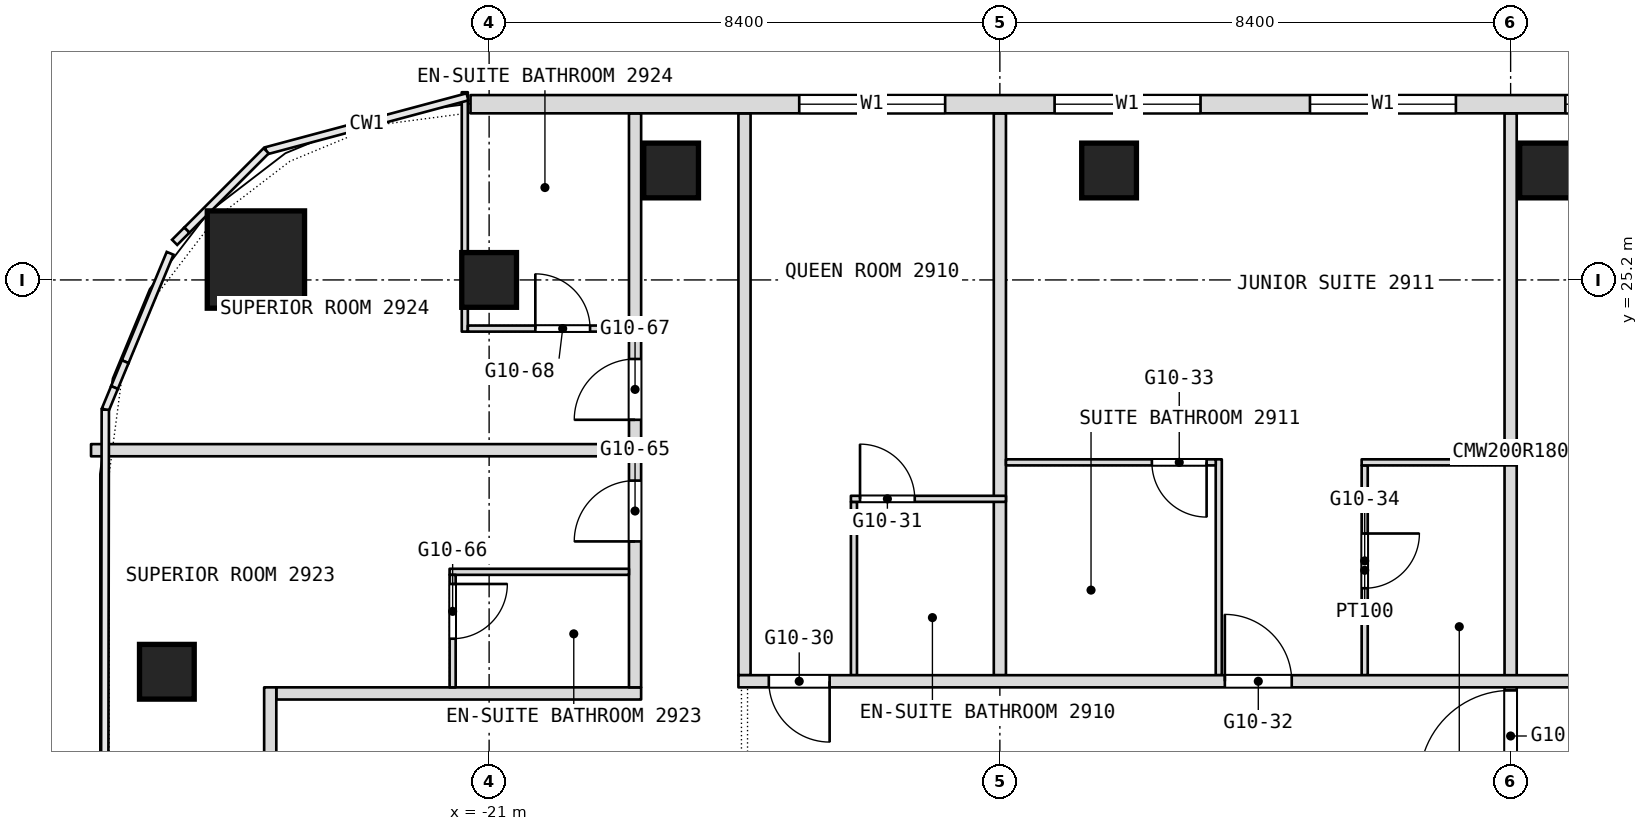
"""IFC4 building model, lengths in metres.
Left out: names, types, materials, properties, quantities, classifications, styles, units other than length and angle.
Written with IfcOpenShell. Run it as: python <this file> out.ifc"""

import sys

from ifc_helpers import new_model, si_unit, direction, frame, frame_2d, origin, origin_2d, place, context, subcontext, project, spatial, rectangle, extrude, element, fill, save


model = new_model("IFC4")
c1 = context("Model", 3, precision=1e-05, world=origin(), true_north=direction((0.0, 1.0)))
c2 = subcontext(c1, "Body", "Model", "MODEL_VIEW")
j1 = project(units=[si_unit("LENGTHUNIT", "METRE"), si_unit("PLANEANGLEUNIT", "RADIAN")], contexts=[c1])
p1 = place(None, origin())
s1 = spatial("IfcSite", under=j1, at=p1, CompositionType="ELEMENT")
p2 = place(p1, origin())
s2 = spatial("IfcBuilding", under=s1, at=p2, CompositionType="ELEMENT")
p3 = place(p2, frame((0.0, 0.0, 130.1)))
s3 = spatial("IfcBuildingStorey", under=s2, at=p3, CompositionType="ELEMENT", Elevation=130.1)
p4 = place(p3, frame((-24.835, 25.535, 0.0), z_axis=(0.0, 0.0, 1.0), x_axis=(1.0, 0.0, 0.0)))
e1 = element("IfcColumn", 1, at=p4, inside=s3, PredefinedType="COLUMN", context=c2, shape_type="SweptSolid", body=[
    extrude(rectangle(XDim=1.6, YDim=1.6, at=origin_2d()), origin(), (0.0, 0.0, 1.0), 3.6),
])
for number, where, z_axis, x_axis in (
    (2, (-21.0, 25.2, 0.0), (0.0, 0.0, 1.0), (1.0, 0.0, 0.0)),
    (3, (-26.3, 18.756, 0.0), (0.0, 0.0, 1.0), (1.0, 0.0, 0.0)),
    (4, (-18.007, 27.0, 0.0), (0.0, 0.0, 1.0), (1.0, 0.0, 0.0)),
    (5, (-10.804, 27.0, 0.0), (0.0, 0.0, 1.0), (1.0, 0.0, 0.0)),
    (6, (-3.601, 27.0, 0.0), (0.0, 0.0, 1.0), (1.0, 0.0, 0.0)),
):
    element("IfcColumn", number, at=place(p3, frame(where, z_axis=z_axis, x_axis=x_axis)), inside=s3, PredefinedType="COLUMN", context=c2, shape_type="SweptSolid", body=[
        extrude(rectangle(XDim=0.9, YDim=0.9, at=origin_2d()), origin(), (0.0, 0.0, 1.0), 3.6),
    ])
p5 = place(p3, frame((-4.2, 16.8, 0.0), z_axis=(0.0, 0.0, 1.0), x_axis=(0.0, 1.0, 0.0)))
e7 = element("IfcWall", 7, at=p5, inside=s3, PredefinedType="PARTITIONING", context=c2, shape_type="SweptSolid", body=[
    extrude(rectangle(XDim=11.14, YDim=0.2, at=frame_2d((5.57, 0.0))), origin(), (0.0, 0.0, 1.0), 3.34),
])
p6 = place(p5, frame((0.15, 0.0, 0.0)))
e8 = element("IfcOpeningElement", 8, at=p6, cuts=e7, PredefinedType="OPENING", context=c2, shape_type="SweptSolid", body=[
    extrude(rectangle(XDim=1.5, YDim=2.1, at=frame_2d((0.75, 1.05))), frame((0.0, 0.1, 0.0), z_axis=(0.0, -1.0, 0.0), x_axis=(1.0, 0.0, 0.0)), (0.0, 0.0, 1.0), 0.2),
])
p7 = place(p3, frame((-6.6, 18.7, 0.0), z_axis=(0.0, 0.0, 1.0), x_axis=(0.0, 1.0, 0.0)))
e9 = element("IfcWall", 9, at=p7, inside=s3, PredefinedType="PARTITIONING", context=c2, shape_type="SweptSolid", body=[
    extrude(rectangle(XDim=3.45, YDim=0.1, at=frame_2d((1.725, 0.0))), origin(), (0.0, 0.0, 1.0), 3.34),
])
p8 = place(p7, frame((1.43, 0.0, 0.0)))
e10 = element("IfcOpeningElement", 10, at=p8, cuts=e9, PredefinedType="OPENING", context=c2, shape_type="SweptSolid", body=[
    extrude(rectangle(XDim=0.9, YDim=2.1, at=frame_2d((0.45, 1.05))), frame((0.0, 0.05, 0.0), z_axis=(0.0, -1.0, 0.0), x_axis=(1.0, 0.0, 0.0)), (0.0, 0.0, 1.0), 0.1),
])
p9 = place(p3, frame((-9.0, 18.7, 0.0), z_axis=(0.0, 0.0, 1.0), x_axis=(0.0, 1.0, 0.0)))
e11 = element("IfcWall", 11, at=p9, inside=s3, PredefinedType="PARTITIONING", context=c2, shape_type="SweptSolid", body=[
    extrude(rectangle(XDim=3.55, YDim=0.1, at=frame_2d((1.775, 0.0))), origin(), (0.0, 0.0, 1.0), 3.34),
])
p10 = place(p3, frame((-12.6, 18.7, 0.0), z_axis=(0.0, 0.0, 1.0), x_axis=(0.0, 1.0, 0.0)))
e12 = element("IfcWall", 12, at=p10, inside=s3, PredefinedType="PARTITIONING", context=c2, shape_type="SweptSolid", body=[
    extrude(rectangle(XDim=9.24, YDim=0.2, at=frame_2d((4.62, 0.0))), origin(), (0.0, 0.0, 1.0), 3.34),
])
p11 = place(p3, frame((-15.0, 18.7, 0.0), z_axis=(0.0, 0.0, 1.0), x_axis=(0.0, 1.0, 0.0)))
e13 = element("IfcWall", 13, at=p11, inside=s3, PredefinedType="PARTITIONING", context=c2, shape_type="SweptSolid", body=[
    extrude(rectangle(XDim=2.85, YDim=0.1, at=frame_2d((1.425, 0.0))), origin(), (0.0, 0.0, 1.0), 3.34),
])
p12 = place(p3, frame((-16.8, 18.7, 0.0), z_axis=(0.0, 0.0, 1.0), x_axis=(0.0, 1.0, 0.0)))
e14 = element("IfcWall", 14, at=p12, inside=s3, PredefinedType="PARTITIONING", context=c2, shape_type="SweptSolid", body=[
    extrude(rectangle(XDim=9.24, YDim=0.2, at=frame_2d((4.62, 0.0))), origin(), (0.0, 0.0, 1.0), 3.34),
])
p13 = place(p3, frame((-24.5, 18.4, 0.0), z_axis=(0.0, 0.0, 1.0), x_axis=(1.0, 0.0, 0.0)))
e15 = element("IfcWall", 15, at=p13, inside=s3, PredefinedType="PARTITIONING", context=c2, shape_type="SweptSolid", body=[
    extrude(rectangle(XDim=6.0, YDim=0.2, at=frame_2d((3.0, 0.0))), origin(), (0.0, 0.0, 1.0), 3.34),
])
p14 = place(p3, frame((-18.6, 18.5, 0.0), z_axis=(0.0, 0.0, 1.0), x_axis=(0.0, 1.0, 0.0)))
e16 = element("IfcWall", 16, at=p14, inside=s3, PredefinedType="PARTITIONING", context=c2, shape_type="SweptSolid", body=[
    extrude(rectangle(XDim=9.44, YDim=0.2, at=frame_2d((4.72, 0.0))), origin(), (0.0, 0.0, 1.0), 3.34),
])
p15 = place(p14, frame((2.4, 0.0, 0.0)))
e17 = element("IfcOpeningElement", 17, at=p15, cuts=e16, PredefinedType="OPENING", context=c2, shape_type="SweptSolid", body=[
    extrude(rectangle(XDim=1.0, YDim=2.1, at=frame_2d((0.5, 1.05))), frame((0.0, 0.1, 0.0), z_axis=(0.0, -1.0, 0.0), x_axis=(1.0, 0.0, 0.0)), (0.0, 0.0, 1.0), 0.2),
])
p16 = place(p14, frame((4.4, 0.0, 0.0)))
e18 = element("IfcOpeningElement", 18, at=p16, cuts=e16, PredefinedType="OPENING", context=c2, shape_type="SweptSolid", body=[
    extrude(rectangle(XDim=1.0, YDim=2.1, at=frame_2d((0.5, 1.05))), frame((0.0, 0.1, 0.0), z_axis=(0.0, -1.0, 0.0), x_axis=(1.0, 0.0, 0.0)), (0.0, 0.0, 1.0), 0.2),
])
p17 = place(p3, frame((-16.9, 18.6, 0.0), z_axis=(0.0, 0.0, 1.0), x_axis=(1.0, 0.0, 0.0)))
e19 = element("IfcWall", 19, at=p17, inside=s3, PredefinedType="PARTITIONING", context=c2, shape_type="SweptSolid", body=[
    extrude(rectangle(XDim=18.4, YDim=0.2, at=frame_2d((9.2, 0.0))), origin(), (0.0, 0.0, 1.0), 3.34),
])
p18 = place(p17, frame((0.5, 0.0, 0.0)))
e20 = element("IfcOpeningElement", 20, at=p18, cuts=e19, PredefinedType="OPENING", context=c2, shape_type="SweptSolid", body=[
    extrude(rectangle(XDim=1.0, YDim=2.1, at=frame_2d((0.5, 1.05))), frame((0.0, 0.1, 0.0), z_axis=(0.0, -1.0, 0.0), x_axis=(1.0, 0.0, 0.0)), (0.0, 0.0, 1.0), 0.2),
])
p19 = place(p17, frame((8.0, 0.0, 0.0)))
e21 = element("IfcOpeningElement", 21, at=p19, cuts=e19, PredefinedType="OPENING", context=c2, shape_type="SweptSolid", body=[
    extrude(rectangle(XDim=1.1, YDim=2.1, at=frame_2d((0.55, 1.05))), frame((0.0, 0.1, 0.0), z_axis=(0.0, -1.0, 0.0), x_axis=(1.0, 0.0, 0.0)), (0.0, 0.0, 1.0), 0.2),
])
p20 = place(p17, frame((16.0, 0.0, 0.0)))
e22 = element("IfcOpeningElement", 22, at=p20, cuts=e19, PredefinedType="OPENING", context=c2, shape_type="SweptSolid", body=[
    extrude(rectangle(XDim=1.8, YDim=2.1, at=frame_2d((0.9, 1.05))), frame((0.0, 0.1, 0.0), z_axis=(0.0, -1.0, 0.0), x_axis=(1.0, 0.0, 0.0)), (0.0, 0.0, 1.0), 0.2),
])
p21 = place(p3, frame((-21.65, 20.4, 0.0), z_axis=(0.0, 0.0, 1.0), x_axis=(1.0, 0.0, 0.0)))
e23 = element("IfcWall", 23, at=p21, inside=s3, PredefinedType="PARTITIONING", context=c2, shape_type="SweptSolid", body=[
    extrude(rectangle(XDim=2.95, YDim=0.1, at=frame_2d((1.475, 0.0))), origin(), (0.0, 0.0, 1.0), 3.34),
])
p22 = place(p3, frame((-21.4, 24.35, 0.0), z_axis=(0.0, 0.0, 1.0), x_axis=(0.0, 1.0, 0.0)))
e24 = element("IfcWall", 24, at=p22, inside=s3, PredefinedType="PARTITIONING", context=c2, shape_type="SweptSolid", body=[
    extrude(rectangle(XDim=3.937, YDim=0.1, at=frame_2d((1.969, 0.0))), origin(), (0.0, 0.0, 1.0), 3.34),
])
p23 = place(p3, frame((-21.6, 18.5, 0.0), z_axis=(0.0, 0.0, 1.0), x_axis=(0.0, 1.0, 0.0)))
e25 = element("IfcWall", 25, at=p23, inside=s3, PredefinedType="PARTITIONING", context=c2, shape_type="SweptSolid", body=[
    extrude(rectangle(XDim=1.85, YDim=0.1, at=frame_2d((0.925, 0.0))), origin(), (0.0, 0.0, 1.0), 3.34),
])
p24 = place(p23, frame((0.8, 0.0, 0.0)))
e26 = element("IfcOpeningElement", 26, at=p24, cuts=e25, PredefinedType="OPENING", context=c2, shape_type="SweptSolid", body=[
    extrude(rectangle(XDim=0.9, YDim=2.1, at=frame_2d((0.45, 1.05))), frame((0.0, 0.05, 0.0), z_axis=(0.0, -1.0, 0.0), x_axis=(1.0, 0.0, 0.0)), (0.0, 0.0, 1.0), 0.1),
])
p25 = place(p3, frame((-15.05, 21.6, 0.0), z_axis=(0.0, 0.0, 1.0), x_axis=(1.0, 0.0, 0.0)))
e27 = element("IfcWall", 27, at=p25, inside=s3, PredefinedType="PARTITIONING", context=c2, shape_type="SweptSolid", body=[
    extrude(rectangle(XDim=2.55, YDim=0.1, at=frame_2d((1.275, 0.0))), origin(), (0.0, 0.0, 1.0), 3.34),
])
p26 = place(p25, frame((0.15, 0.0, 0.0)))
e28 = element("IfcOpeningElement", 28, at=p26, cuts=e27, PredefinedType="OPENING", context=c2, shape_type="SweptSolid", body=[
    extrude(rectangle(XDim=0.9, YDim=2.1, at=frame_2d((0.45, 1.05))), frame((0.0, 0.05, 0.0), z_axis=(0.0, -1.0, 0.0), x_axis=(1.0, 0.0, 0.0)), (0.0, 0.0, 1.0), 0.1),
])
p27 = place(p3, frame((-12.5, 22.2, 0.0), z_axis=(0.0, 0.0, 1.0), x_axis=(1.0, 0.0, 0.0)))
e29 = element("IfcWall", 29, at=p27, inside=s3, PredefinedType="PARTITIONING", context=c2, shape_type="SweptSolid", body=[
    extrude(rectangle(XDim=3.45, YDim=0.1, at=frame_2d((1.725, 0.0))), origin(), (0.0, 0.0, 1.0), 3.34),
])
p28 = place(p27, frame((2.4, 0.0, 0.0)))
e30 = element("IfcOpeningElement", 30, at=p28, cuts=e29, PredefinedType="OPENING", context=c2, shape_type="SweptSolid", body=[
    extrude(rectangle(XDim=0.9, YDim=2.1, at=frame_2d((0.45, 1.05))), frame((0.0, 0.05, 0.0), z_axis=(0.0, -1.0, 0.0), x_axis=(1.0, 0.0, 0.0)), (0.0, 0.0, 1.0), 0.1),
])
p29 = place(p3, frame((-6.65, 22.2, 0.0), z_axis=(0.0, 0.0, 1.0), x_axis=(1.0, 0.0, 0.0)))
e31 = element("IfcWall", 31, at=p29, inside=s3, PredefinedType="PARTITIONING", context=c2, shape_type="SweptSolid", body=[
    extrude(rectangle(XDim=2.55, YDim=0.1, at=frame_2d((1.275, 0.0))), origin(), (0.0, 0.0, 1.0), 3.34),
])
p30 = place(p3, frame((-27.547, 22.4, 0.0), z_axis=(0.0, 0.0, 1.0), x_axis=(1.0, 0.0, 0.0)))
e32 = element("IfcWall", 32, at=p30, inside=s3, PredefinedType="PARTITIONING", context=c2, shape_type="SweptSolid", body=[
    extrude(rectangle(XDim=8.847, YDim=0.2, at=frame_2d((4.424, 0.0))), origin(), (0.0, 0.0, 1.0), 3.34),
])
p31 = place(p3, frame((-21.35, 24.4, 0.0), z_axis=(0.0, 0.0, 1.0), x_axis=(1.0, 0.0, 0.0)))
e33 = element("IfcWall", 33, at=p31, inside=s3, PredefinedType="PARTITIONING", context=c2, shape_type="SweptSolid", body=[
    extrude(rectangle(XDim=2.65, YDim=0.1, at=frame_2d((1.325, 0.0))), origin(), (0.0, 0.0, 1.0), 3.34),
])
p32 = place(p31, frame((1.11, 0.0, 0.0)))
e34 = element("IfcOpeningElement", 34, at=p32, cuts=e33, PredefinedType="OPENING", context=c2, shape_type="SweptSolid", body=[
    extrude(rectangle(XDim=0.9, YDim=2.1, at=frame_2d((0.45, 1.05))), frame((0.0, 0.05, 0.0), z_axis=(0.0, -1.0, 0.0), x_axis=(1.0, 0.0, 0.0)), (0.0, 0.0, 1.0), 0.1),
])
p33 = place(p3, frame((-24.6, 6.9, 0.0), z_axis=(0.0, 0.0, 1.0), x_axis=(0.0, 1.0, 0.0)))
e35 = element("IfcWall", 35, at=p33, inside=s3, PredefinedType="PARTITIONING", context=c2, shape_type="SweptSolid", body=[
    extrude(rectangle(XDim=11.6, YDim=0.2, at=frame_2d((5.8, 0.0))), origin(), (0.0, 0.0, 1.0), 3.34),
])
p34 = place(p33, frame((5.45, 0.0, 0.0)))
e36 = element("IfcOpeningElement", 36, at=p34, cuts=e35, PredefinedType="OPENING", context=c2, shape_type="SweptSolid", body=[
    extrude(rectangle(XDim=1.8, YDim=2.1, at=frame_2d((0.9, 1.05))), frame((0.0, 0.1, 0.0), z_axis=(0.0, -1.0, 0.0), x_axis=(1.0, 0.0, 0.0)), (0.0, 0.0, 1.0), 0.2),
])
p35 = place(p3, frame((21.306, 28.09, 0.0), z_axis=(0.0, 0.0, 1.0), x_axis=(-1.0, 0.0, 0.0)))
e37 = element("IfcWall", 37, at=p35, inside=s3, PredefinedType="NOTDEFINED", context=c2, shape_type="SweptSolid", body=[
    extrude(rectangle(XDim=42.612, YDim=0.3, at=frame_2d((21.306, 0.0))), origin(), (0.0, 0.0, 1.0), 3.6),
])
p36 = place(p35, frame((5.406, 0.0, 0.9)))
e38 = element("IfcOpeningElement", 38, at=p36, cuts=e37, PredefinedType="OPENING", context=c2, shape_type="SweptSolid", body=[
    extrude(rectangle(XDim=2.4, YDim=2.1, at=frame_2d((1.2, 1.05))), frame((0.0, 0.15, 0.0), z_axis=(0.0, -1.0, 0.0), x_axis=(1.0, 0.0, 0.0)), (0.0, 0.0, 1.0), 0.3),
])
p37 = place(p35, frame((9.606, 0.0, 0.9)))
e39 = element("IfcOpeningElement", 39, at=p37, cuts=e37, PredefinedType="OPENING", context=c2, shape_type="SweptSolid", body=[
    extrude(rectangle(XDim=2.4, YDim=2.1, at=frame_2d((1.2, 1.05))), frame((0.0, 0.15, 0.0), z_axis=(0.0, -1.0, 0.0), x_axis=(1.0, 0.0, 0.0)), (0.0, 0.0, 1.0), 0.3),
])
p38 = place(p35, frame((13.806, 0.0, 0.9)))
e40 = element("IfcOpeningElement", 40, at=p38, cuts=e37, PredefinedType="OPENING", context=c2, shape_type="SweptSolid", body=[
    extrude(rectangle(XDim=2.4, YDim=2.1, at=frame_2d((1.2, 1.05))), frame((0.0, 0.15, 0.0), z_axis=(0.0, -1.0, 0.0), x_axis=(1.0, 0.0, 0.0)), (0.0, 0.0, 1.0), 0.3),
])
p39 = place(p35, frame((18.006, 0.0, 0.9)))
e41 = element("IfcOpeningElement", 41, at=p39, cuts=e37, PredefinedType="OPENING", context=c2, shape_type="SweptSolid", body=[
    extrude(rectangle(XDim=2.4, YDim=2.1, at=frame_2d((1.2, 1.05))), frame((0.0, 0.15, 0.0), z_axis=(0.0, -1.0, 0.0), x_axis=(1.0, 0.0, 0.0)), (0.0, 0.0, 1.0), 0.3),
])
p40 = place(p35, frame((22.206, 0.0, 0.9)))
e42 = element("IfcOpeningElement", 42, at=p40, cuts=e37, PredefinedType="OPENING", context=c2, shape_type="SweptSolid", body=[
    extrude(rectangle(XDim=2.4, YDim=2.1, at=frame_2d((1.2, 1.05))), frame((0.0, 0.15, 0.0), z_axis=(0.0, -1.0, 0.0), x_axis=(1.0, 0.0, 0.0)), (0.0, 0.0, 1.0), 0.3),
])
p41 = place(p35, frame((26.406, 0.0, 0.9)))
e43 = element("IfcOpeningElement", 43, at=p41, cuts=e37, PredefinedType="OPENING", context=c2, shape_type="SweptSolid", body=[
    extrude(rectangle(XDim=2.4, YDim=2.1, at=frame_2d((1.2, 1.05))), frame((0.0, 0.15, 0.0), z_axis=(0.0, -1.0, 0.0), x_axis=(1.0, 0.0, 0.0)), (0.0, 0.0, 1.0), 0.3),
])
p42 = place(p35, frame((30.606, 0.0, 0.9)))
e44 = element("IfcOpeningElement", 44, at=p42, cuts=e37, PredefinedType="OPENING", context=c2, shape_type="SweptSolid", body=[
    extrude(rectangle(XDim=2.4, YDim=2.1, at=frame_2d((1.2, 1.05))), frame((0.0, 0.15, 0.0), z_axis=(0.0, -1.0, 0.0), x_axis=(1.0, 0.0, 0.0)), (0.0, 0.0, 1.0), 0.3),
])
p43 = place(p35, frame((34.806, 0.0, 0.9)))
e45 = element("IfcOpeningElement", 45, at=p43, cuts=e37, PredefinedType="OPENING", context=c2, shape_type="SweptSolid", body=[
    extrude(rectangle(XDim=2.4, YDim=2.1, at=frame_2d((1.2, 1.05))), frame((0.0, 0.15, 0.0), z_axis=(0.0, -1.0, 0.0), x_axis=(1.0, 0.0, 0.0)), (0.0, 0.0, 1.0), 0.3),
])
p44 = place(p8, origin())
e46 = element("IfcDoor", 46, at=p44, inside=s3, OperationType="SINGLE_SWING_LEFT", PredefinedType="DOOR", context=c2, shape_type="SweptSolid", body=[
    extrude(rectangle(XDim=0.9, YDim=2.1, at=frame_2d((0.45, 1.05))), frame((0.0, 0.025, 0.0), z_axis=(0.0, -1.0, 0.0), x_axis=(1.0, 0.0, 0.0)), (0.0, 0.0, 1.0), 0.05),
])
fill(e10, e46)
p45 = place(p15, origin())
e47 = element("IfcDoor", 47, at=p45, inside=s3, OperationType="SINGLE_SWING_RIGHT", PredefinedType="DOOR", context=c2, shape_type="SweptSolid", body=[
    extrude(rectangle(XDim=1.0, YDim=2.1, at=frame_2d((0.5, 1.05))), frame((0.0, 0.025, 0.0), z_axis=(0.0, -1.0, 0.0), x_axis=(1.0, 0.0, 0.0)), (0.0, 0.0, 1.0), 0.05),
])
fill(e17, e47)
p46 = place(p16, origin())
e48 = element("IfcDoor", 48, at=p46, inside=s3, OperationType="SINGLE_SWING_RIGHT", PredefinedType="DOOR", context=c2, shape_type="SweptSolid", body=[
    extrude(rectangle(XDim=1.0, YDim=2.1, at=frame_2d((0.5, 1.05))), frame((0.0, 0.025, 0.0), z_axis=(0.0, -1.0, 0.0), x_axis=(1.0, 0.0, 0.0)), (0.0, 0.0, 1.0), 0.05),
])
fill(e18, e48)
p47 = place(p18, origin())
e49 = element("IfcDoor", 49, at=p47, inside=s3, OperationType="SINGLE_SWING_LEFT", PredefinedType="DOOR", context=c2, shape_type="SweptSolid", body=[
    extrude(rectangle(XDim=1.0, YDim=2.1, at=frame_2d((0.5, 1.05))), frame((0.0, 0.025, 0.0), z_axis=(0.0, -1.0, 0.0), x_axis=(1.0, 0.0, 0.0)), (0.0, 0.0, 1.0), 0.05),
])
fill(e20, e49)
p48 = place(p19, origin())
e50 = element("IfcDoor", 50, at=p48, inside=s3, OperationType="SINGLE_SWING_LEFT", PredefinedType="DOOR", context=c2, shape_type="SweptSolid", body=[
    extrude(rectangle(XDim=1.1, YDim=2.1, at=frame_2d((0.55, 1.05))), frame((0.0, 0.025, 0.0), z_axis=(0.0, -1.0, 0.0), x_axis=(1.0, 0.0, 0.0)), (0.0, 0.0, 1.0), 0.05),
])
fill(e21, e50)
p49 = place(p24, origin())
e51 = element("IfcDoor", 51, at=p49, inside=s3, OperationType="SINGLE_SWING_LEFT", PredefinedType="DOOR", context=c2, shape_type="SweptSolid", body=[
    extrude(rectangle(XDim=0.9, YDim=2.1, at=frame_2d((0.45, 1.05))), frame((0.0, 0.025, 0.0), z_axis=(0.0, -1.0, 0.0), x_axis=(1.0, 0.0, 0.0)), (0.0, 0.0, 1.0), 0.05),
])
fill(e26, e51)
p50 = place(p26, origin())
e52 = element("IfcDoor", 52, at=p50, inside=s3, OperationType="SINGLE_SWING_RIGHT", PredefinedType="DOOR", context=c2, shape_type="SweptSolid", body=[
    extrude(rectangle(XDim=0.9, YDim=2.1, at=frame_2d((0.45, 1.05))), frame((0.0, 0.025, 0.0), z_axis=(0.0, -1.0, 0.0), x_axis=(1.0, 0.0, 0.0)), (0.0, 0.0, 1.0), 0.05),
])
fill(e28, e52)
p51 = place(p28, origin())
e53 = element("IfcDoor", 53, at=p51, inside=s3, OperationType="SINGLE_SWING_LEFT", PredefinedType="DOOR", context=c2, shape_type="SweptSolid", body=[
    extrude(rectangle(XDim=0.9, YDim=2.1, at=frame_2d((0.45, 1.05))), frame((0.0, 0.025, 0.0), z_axis=(0.0, -1.0, 0.0), x_axis=(1.0, 0.0, 0.0)), (0.0, 0.0, 1.0), 0.05),
])
fill(e30, e53)
p52 = place(p32, origin())
e54 = element("IfcDoor", 54, at=p52, inside=s3, OperationType="SINGLE_SWING_LEFT", PredefinedType="DOOR", context=c2, shape_type="SweptSolid", body=[
    extrude(rectangle(XDim=0.9, YDim=2.1, at=frame_2d((0.45, 1.05))), frame((0.0, 0.025, 0.0), z_axis=(0.0, -1.0, 0.0), x_axis=(1.0, 0.0, 0.0)), (0.0, 0.0, 1.0), 0.05),
])
fill(e34, e54)
p53 = place(p40, origin())
e55 = element("IfcWindow", 55, at=p53, inside=s3, PartitioningType="SINGLE_PANEL", PredefinedType="WINDOW", context=c2, shape_type="SweptSolid", body=[
    extrude(rectangle(XDim=2.4, YDim=2.1, at=frame_2d((1.2, 1.05))), frame((0.0, 0.03, 0.0), z_axis=(0.0, -1.0, 0.0), x_axis=(1.0, 0.0, 0.0)), (0.0, 0.0, 1.0), 0.06),
])
fill(e42, e55)
p54 = place(p41, origin())
e56 = element("IfcWindow", 56, at=p54, inside=s3, PartitioningType="SINGLE_PANEL", PredefinedType="WINDOW", context=c2, shape_type="SweptSolid", body=[
    extrude(rectangle(XDim=2.4, YDim=2.1, at=frame_2d((1.2, 1.05))), frame((0.0, 0.03, 0.0), z_axis=(0.0, -1.0, 0.0), x_axis=(1.0, 0.0, 0.0)), (0.0, 0.0, 1.0), 0.06),
])
fill(e43, e56)
p55 = place(p42, origin())
e57 = element("IfcWindow", 57, at=p55, inside=s3, PartitioningType="SINGLE_PANEL", PredefinedType="WINDOW", context=c2, shape_type="SweptSolid", body=[
    extrude(rectangle(XDim=2.4, YDim=2.1, at=frame_2d((1.2, 1.05))), frame((0.0, 0.03, 0.0), z_axis=(0.0, -1.0, 0.0), x_axis=(1.0, 0.0, 0.0)), (0.0, 0.0, 1.0), 0.06),
])
fill(e44, e57)
p56 = place(p43, origin())
e58 = element("IfcWindow", 58, at=p56, inside=s3, PartitioningType="SINGLE_PANEL", PredefinedType="WINDOW", context=c2, shape_type="SweptSolid", body=[
    extrude(rectangle(XDim=2.4, YDim=2.1, at=frame_2d((1.2, 1.05))), frame((0.0, 0.03, 0.0), z_axis=(0.0, -1.0, 0.0), x_axis=(1.0, 0.0, 0.0)), (0.0, 0.0, 1.0), 0.06),
])
fill(e45, e58)
p57 = place(p6, origin())
e59 = element("IfcDoor", 59, at=p57, inside=s3, OperationType="DOUBLE_DOOR_DOUBLE_SWING", PredefinedType="DOOR", context=c2, shape_type="SweptSolid", body=[
    extrude(rectangle(XDim=1.5, YDim=2.1, at=frame_2d((0.75, 1.05))), frame((0.0, 0.025, 0.0), z_axis=(0.0, -1.0, 0.0), x_axis=(1.0, 0.0, 0.0)), (0.0, 0.0, 1.0), 0.05),
])
fill(e8, e59)
save(model, sys.argv[1])
